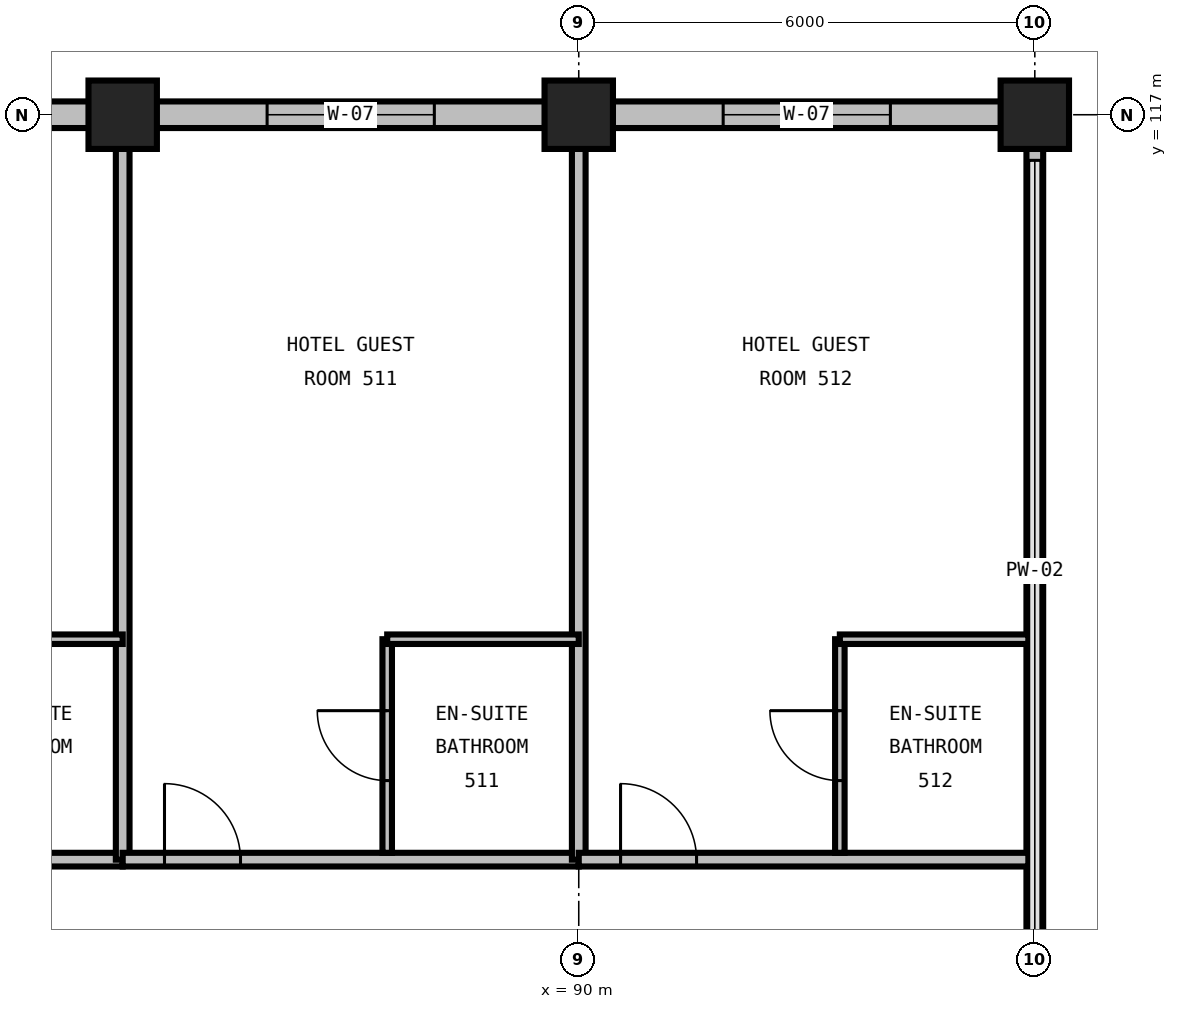
"""IFC4 building model, lengths in metres.
Left out: names, types, materials, properties, quantities, classifications, styles, units other than length and angle.
Written with IfcOpenShell. Run it as: python <this file> out.ifc"""

import sys

from ifc_helpers import new_model, si_unit, direction, frame, frame_2d, origin, origin_2d, place, context, subcontext, project, spatial, rectangle, extrude, element, fill, save


model = new_model("IFC4")
c1 = context("Model", 3, precision=1e-05, world=origin(), true_north=direction((0.0, 1.0)))
c2 = subcontext(c1, "Body", "Model", "MODEL_VIEW")
j1 = project(units=[si_unit("LENGTHUNIT", "METRE"), si_unit("PLANEANGLEUNIT", "RADIAN")], contexts=[c1])
p1 = place(None, origin())
s1 = spatial("IfcSite", under=j1, at=p1, CompositionType="ELEMENT")
p2 = place(p1, origin())
s2 = spatial("IfcBuilding", under=s1, at=p2, CompositionType="ELEMENT")
p3 = place(p2, frame((0.0, 0.0, 27.6)))
s3 = spatial("IfcBuildingStorey", under=s2, at=p3, CompositionType="ELEMENT", Elevation=27.6)
for number, where, z_axis, x_axis in (
    (1, (84.0, 117.0, 0.0), (0.0, 0.0, 1.0), (1.0, 0.0, 0.0)),
    (2, (90.0, 117.0, 0.0), (0.0, 0.0, 1.0), (1.0, 0.0, 0.0)),
    (3, (96.0, 117.0, 0.0), (0.0, 0.0, 1.0), (1.0, 0.0, 0.0)),
):
    element("IfcColumn", number, at=place(p3, frame(where, z_axis=z_axis, x_axis=x_axis)), inside=s3, PredefinedType="COLUMN", context=c2, shape_type="SweptSolid", body=[
        extrude(rectangle(XDim=0.9, YDim=0.9, at=origin_2d()), origin(), (0.0, 0.0, 1.0), 3.6),
    ])
p4 = place(p3, frame((84.0, 117.0, 0.0), z_axis=(0.0, 0.0, 1.0), x_axis=(-1.0, 0.0, 0.0)))
e4 = element("IfcWall", 4, at=p4, inside=s3, PredefinedType="STANDARD", context=c2, shape_type="SweptSolid", body=[
    extrude(rectangle(XDim=6.0, YDim=0.35, at=frame_2d((3.0, 0.0))), origin(), (0.0, 0.0, 1.0), 2.486),
])
p5 = place(p4, frame((1.9, 0.0, 0.75)))
e5 = element("IfcOpeningElement", 5, at=p5, cuts=e4, PredefinedType="OPENING", context=c2, shape_type="SweptSolid", body=[
    extrude(rectangle(XDim=2.2, YDim=1.6, at=frame_2d((1.1, 0.8))), frame((0.0, 0.19, 0.0), z_axis=(0.0, -1.0, 0.0), x_axis=(1.0, 0.0, 0.0)), (0.0, 0.0, 1.0), 0.38),
])
p6 = place(p3, frame((90.0, 117.0, 0.0), z_axis=(0.0, 0.0, 1.0), x_axis=(-1.0, 0.0, 0.0)))
e6 = element("IfcWall", 6, at=p6, inside=s3, PredefinedType="STANDARD", context=c2, shape_type="SweptSolid", body=[
    extrude(rectangle(XDim=6.0, YDim=0.35, at=frame_2d((3.0, 0.0))), origin(), (0.0, 0.0, 1.0), 2.486),
])
p7 = place(p6, frame((1.9, 0.0, 0.75)))
e7 = element("IfcOpeningElement", 7, at=p7, cuts=e6, PredefinedType="OPENING", context=c2, shape_type="SweptSolid", body=[
    extrude(rectangle(XDim=2.2, YDim=1.6, at=frame_2d((1.1, 0.8))), frame((0.0, 0.19, 0.0), z_axis=(0.0, -1.0, 0.0), x_axis=(1.0, 0.0, 0.0)), (0.0, 0.0, 1.0), 0.38),
])
p8 = place(p3, frame((96.0, 117.0, 0.0), z_axis=(0.0, 0.0, 1.0), x_axis=(-1.0, 0.0, 0.0)))
e8 = element("IfcWall", 8, at=p8, inside=s3, PredefinedType="STANDARD", context=c2, shape_type="SweptSolid", body=[
    extrude(rectangle(XDim=6.0, YDim=0.35, at=frame_2d((3.0, 0.0))), origin(), (0.0, 0.0, 1.0), 2.486),
])
p9 = place(p8, frame((1.9, 0.0, 0.75)))
e9 = element("IfcOpeningElement", 9, at=p9, cuts=e8, PredefinedType="OPENING", context=c2, shape_type="SweptSolid", body=[
    extrude(rectangle(XDim=2.2, YDim=1.6, at=frame_2d((1.1, 0.8))), frame((0.0, 0.19, 0.0), z_axis=(0.0, -1.0, 0.0), x_axis=(1.0, 0.0, 0.0)), (0.0, 0.0, 1.0), 0.38),
])
p10 = place(p3, frame((96.0, 105.0, 0.0), z_axis=(0.0, 0.0, 1.0), x_axis=(0.0, 1.0, 0.0)))
e10 = element("IfcWall", 10, at=p10, inside=s3, PredefinedType="PARAPET", context=c2, shape_type="SweptSolid", body=[
    extrude(rectangle(XDim=12.0, YDim=0.22, at=frame_2d((6.0, 0.0))), origin(), (0.0, 0.0, 1.0), 0.2),
])
p11 = place(p3, frame((78.0, 107.2, 0.0), z_axis=(0.0, 0.0, 1.0), x_axis=(1.0, 0.0, 0.0)))
e11 = element("IfcWall", 11, at=p11, inside=s3, PredefinedType="PARTITIONING", context=c2, shape_type="SweptSolid", body=[
    extrude(rectangle(XDim=6.0, YDim=0.18, at=frame_2d((3.0, 0.0))), origin(), (0.0, 0.0, 1.0), 3.29),
])
p12 = place(p11, frame((0.55, 0.0, 0.0)))
e12 = element("IfcOpeningElement", 12, at=p12, cuts=e11, PredefinedType="OPENING", context=c2, shape_type="SweptSolid", body=[
    extrude(rectangle(XDim=1.0, YDim=2.15, at=frame_2d((0.5, 1.075))), frame((0.0, 0.105, 0.0), z_axis=(0.0, -1.0, 0.0), x_axis=(1.0, 0.0, 0.0)), (0.0, 0.0, 1.0), 0.21),
])
p13 = place(p3, frame((84.0, 107.2, 0.0), z_axis=(0.0, 0.0, 1.0), x_axis=(0.0, 1.0, 0.0)))
e13 = element("IfcWall", 13, at=p13, inside=s3, PredefinedType="PARTITIONING", context=c2, shape_type="SweptSolid", body=[
    extrude(rectangle(XDim=9.625, YDim=0.18, at=frame_2d((4.812, 0.0))), origin(), (0.0, 0.0, 1.0), 2.59),
])
p14 = place(p3, frame((81.48, 110.1, 0.0), z_axis=(0.0, 0.0, 1.0), x_axis=(1.0, 0.0, 0.0)))
e14 = element("IfcWall", 14, at=p14, inside=s3, PredefinedType="PARTITIONING", context=c2, shape_type="SweptSolid", body=[
    extrude(rectangle(XDim=2.52, YDim=0.125, at=frame_2d((1.26, 0.0))), origin(), (0.0, 0.0, 1.0), 3.29),
])
p15 = place(p3, frame((84.0, 107.2, 0.0), z_axis=(0.0, 0.0, 1.0), x_axis=(1.0, 0.0, 0.0)))
e15 = element("IfcWall", 15, at=p15, inside=s3, PredefinedType="PARTITIONING", context=c2, shape_type="SweptSolid", body=[
    extrude(rectangle(XDim=6.0, YDim=0.18, at=frame_2d((3.0, 0.0))), origin(), (0.0, 0.0, 1.0), 3.29),
])
p16 = place(p15, frame((0.55, 0.0, 0.0)))
e16 = element("IfcOpeningElement", 16, at=p16, cuts=e15, PredefinedType="OPENING", context=c2, shape_type="SweptSolid", body=[
    extrude(rectangle(XDim=1.0, YDim=2.15, at=frame_2d((0.5, 1.075))), frame((0.0, 0.105, 0.0), z_axis=(0.0, -1.0, 0.0), x_axis=(1.0, 0.0, 0.0)), (0.0, 0.0, 1.0), 0.21),
])
p17 = place(p3, frame((90.0, 107.2, 0.0), z_axis=(0.0, 0.0, 1.0), x_axis=(0.0, 1.0, 0.0)))
e17 = element("IfcWall", 17, at=p17, inside=s3, PredefinedType="PARTITIONING", context=c2, shape_type="SweptSolid", body=[
    extrude(rectangle(XDim=9.625, YDim=0.18, at=frame_2d((4.812, 0.0))), origin(), (0.0, 0.0, 1.0), 2.59),
])
p18 = place(p3, frame((87.48, 107.29, 0.0), z_axis=(0.0, 0.0, 1.0), x_axis=(0.0, 1.0, 0.0)))
e18 = element("IfcWall", 18, at=p18, inside=s3, PredefinedType="PARTITIONING", context=c2, shape_type="SweptSolid", body=[
    extrude(rectangle(XDim=2.81, YDim=0.125, at=frame_2d((1.405, 0.0))), origin(), (0.0, 0.0, 1.0), 3.29),
])
p19 = place(p18, frame((0.95, 0.0, 0.0)))
e19 = element("IfcOpeningElement", 19, at=p19, cuts=e18, PredefinedType="OPENING", context=c2, shape_type="SweptSolid", body=[
    extrude(rectangle(XDim=0.92, YDim=2.1, at=frame_2d((0.46, 1.05))), frame((0.0, 0.077, 0.0), z_axis=(0.0, -1.0, 0.0), x_axis=(1.0, 0.0, 0.0)), (0.0, 0.0, 1.0), 0.155),
])
p20 = place(p3, frame((87.48, 110.1, 0.0), z_axis=(0.0, 0.0, 1.0), x_axis=(1.0, 0.0, 0.0)))
e20 = element("IfcWall", 20, at=p20, inside=s3, PredefinedType="PARTITIONING", context=c2, shape_type="SweptSolid", body=[
    extrude(rectangle(XDim=2.52, YDim=0.125, at=frame_2d((1.26, 0.0))), origin(), (0.0, 0.0, 1.0), 3.29),
])
p21 = place(p3, frame((90.0, 107.2, 0.0), z_axis=(0.0, 0.0, 1.0), x_axis=(1.0, 0.0, 0.0)))
e21 = element("IfcWall", 21, at=p21, inside=s3, PredefinedType="PARTITIONING", context=c2, shape_type="SweptSolid", body=[
    extrude(rectangle(XDim=5.915, YDim=0.18, at=frame_2d((2.957, 0.0))), origin(), (0.0, 0.0, 1.0), 3.29),
])
p22 = place(p21, frame((0.55, 0.0, 0.0)))
e22 = element("IfcOpeningElement", 22, at=p22, cuts=e21, PredefinedType="OPENING", context=c2, shape_type="SweptSolid", body=[
    extrude(rectangle(XDim=1.0, YDim=2.15, at=frame_2d((0.5, 1.075))), frame((0.0, 0.105, 0.0), z_axis=(0.0, -1.0, 0.0), x_axis=(1.0, 0.0, 0.0)), (0.0, 0.0, 1.0), 0.21),
])
p23 = place(p3, frame((93.435, 107.29, 0.0), z_axis=(0.0, 0.0, 1.0), x_axis=(0.0, 1.0, 0.0)))
e23 = element("IfcWall", 23, at=p23, inside=s3, PredefinedType="PARTITIONING", context=c2, shape_type="SweptSolid", body=[
    extrude(rectangle(XDim=2.81, YDim=0.125, at=frame_2d((1.405, 0.0))), origin(), (0.0, 0.0, 1.0), 3.29),
])
p24 = place(p23, frame((0.95, 0.0, 0.0)))
e24 = element("IfcOpeningElement", 24, at=p24, cuts=e23, PredefinedType="OPENING", context=c2, shape_type="SweptSolid", body=[
    extrude(rectangle(XDim=0.92, YDim=2.1, at=frame_2d((0.46, 1.05))), frame((0.0, 0.077, 0.0), z_axis=(0.0, -1.0, 0.0), x_axis=(1.0, 0.0, 0.0)), (0.0, 0.0, 1.0), 0.155),
])
p25 = place(p3, frame((93.435, 110.1, 0.0), z_axis=(0.0, 0.0, 1.0), x_axis=(1.0, 0.0, 0.0)))
e25 = element("IfcWall", 25, at=p25, inside=s3, PredefinedType="PARTITIONING", context=c2, shape_type="SweptSolid", body=[
    extrude(rectangle(XDim=2.48, YDim=0.125, at=frame_2d((1.24, 0.0))), origin(), (0.0, 0.0, 1.0), 3.29),
])
p26 = place(p7, origin())
e26 = element("IfcWindow", 26, at=p26, inside=s3, PartitioningType="DOUBLE_PANEL_VERTICAL", PredefinedType="WINDOW", context=c2, shape_type="SweptSolid", body=[
    extrude(rectangle(XDim=2.2, YDim=1.6, at=frame_2d((1.1, 0.8))), frame((0.0, 0.03, 0.0), z_axis=(0.0, -1.0, 0.0), x_axis=(1.0, 0.0, 0.0)), (0.0, 0.0, 1.0), 0.06),
])
fill(e7, e26)
p27 = place(p9, origin())
e27 = element("IfcWindow", 27, at=p27, inside=s3, PartitioningType="DOUBLE_PANEL_VERTICAL", PredefinedType="WINDOW", context=c2, shape_type="SweptSolid", body=[
    extrude(rectangle(XDim=2.2, YDim=1.6, at=frame_2d((1.1, 0.8))), frame((0.0, 0.03, 0.0), z_axis=(0.0, -1.0, 0.0), x_axis=(1.0, 0.0, 0.0)), (0.0, 0.0, 1.0), 0.06),
])
fill(e9, e27)
p28 = place(p16, origin())
e28 = element("IfcDoor", 28, at=p28, inside=s3, OperationType="SINGLE_SWING_LEFT", PredefinedType="DOOR", context=c2, shape_type="SweptSolid", body=[
    extrude(rectangle(XDim=1.0, YDim=2.15, at=frame_2d((0.5, 1.075))), frame((0.0, 0.025, 0.0), z_axis=(0.0, -1.0, 0.0), x_axis=(1.0, 0.0, 0.0)), (0.0, 0.0, 1.0), 0.05),
])
fill(e16, e28)
p29 = place(p19, origin())
e29 = element("IfcDoor", 29, at=p29, inside=s3, OperationType="SINGLE_SWING_RIGHT", PredefinedType="DOOR", context=c2, shape_type="SweptSolid", body=[
    extrude(rectangle(XDim=0.92, YDim=2.1, at=frame_2d((0.46, 1.05))), frame((0.0, 0.025, 0.0), z_axis=(0.0, -1.0, 0.0), x_axis=(1.0, 0.0, 0.0)), (0.0, 0.0, 1.0), 0.05),
])
fill(e19, e29)
p30 = place(p22, origin())
e30 = element("IfcDoor", 30, at=p30, inside=s3, OperationType="SINGLE_SWING_LEFT", PredefinedType="DOOR", context=c2, shape_type="SweptSolid", body=[
    extrude(rectangle(XDim=1.0, YDim=2.15, at=frame_2d((0.5, 1.075))), frame((0.0, 0.025, 0.0), z_axis=(0.0, -1.0, 0.0), x_axis=(1.0, 0.0, 0.0)), (0.0, 0.0, 1.0), 0.05),
])
fill(e22, e30)
p31 = place(p24, origin())
e31 = element("IfcDoor", 31, at=p31, inside=s3, OperationType="SINGLE_SWING_RIGHT", PredefinedType="DOOR", context=c2, shape_type="SweptSolid", body=[
    extrude(rectangle(XDim=0.92, YDim=2.1, at=frame_2d((0.46, 1.05))), frame((0.0, 0.025, 0.0), z_axis=(0.0, -1.0, 0.0), x_axis=(1.0, 0.0, 0.0)), (0.0, 0.0, 1.0), 0.05),
])
fill(e24, e31)
save(model, sys.argv[1])
